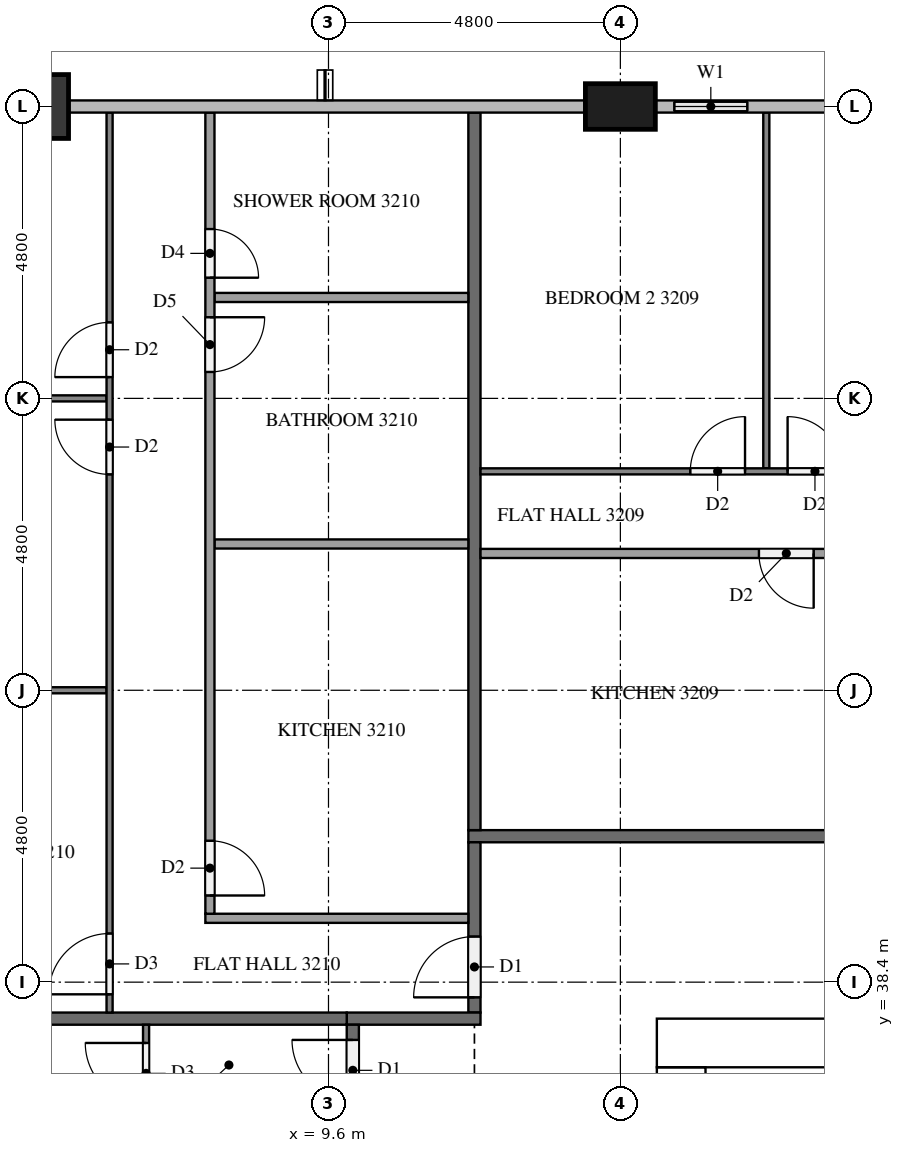
"""IFC4 building model, lengths in metres.
Left out: names, types, materials, properties, quantities, classifications, styles, units other than length and angle.
Written with IfcOpenShell. Run it as: python <this file> out.ifc"""

import sys

from ifc_helpers import new_model, si_unit, direction, frame, frame_2d, origin, origin_2d, place, context, subcontext, project, spatial, rectangle, extrude, element, fill, save


model = new_model("IFC4")
c1 = context("Model", 3, precision=1e-05, world=origin(), true_north=direction((0.0, 1.0)))
c2 = subcontext(c1, "Body", "Model", "MODEL_VIEW")
j1 = project(units=[si_unit("LENGTHUNIT", "METRE"), si_unit("PLANEANGLEUNIT", "RADIAN")], contexts=[c1])
p1 = place(None, origin())
s1 = spatial("IfcSite", under=j1, at=p1, CompositionType="ELEMENT")
p2 = place(p1, origin())
s2 = spatial("IfcBuilding", under=s1, at=p2, CompositionType="ELEMENT")
p3 = place(p2, frame((0.0, 0.0, 126.1)))
s3 = spatial("IfcBuildingStorey", under=s2, at=p3, CompositionType="ELEMENT", Elevation=126.1)
p4 = place(p3, frame((15.0, 37.4, 0.0), z_axis=(0.0, 0.0, 1.0), x_axis=(1.0, 0.0, 0.0)))
e1 = element("IfcWall", 1, at=p4, inside=s3, PredefinedType="SHEAR", context=c2, shape_type="SweptSolid", body=[
    extrude(rectangle(XDim=32.4, YDim=0.8, at=frame_2d((16.2, 0.0))), origin(), (0.0, 0.0, 1.0), 3.2),
])
p5 = place(p4, frame((15.3, 0.0, 0.0)))
e2 = element("IfcOpeningElement", 2, at=p5, cuts=e1, PredefinedType="OPENING", context=c2, shape_type="SweptSolid", body=[
    extrude(rectangle(XDim=1.8, YDim=2.1, at=frame_2d((0.9, 1.05))), frame((0.0, 0.41, 0.0), z_axis=(0.0, -1.0, 0.0), x_axis=(1.0, 0.0, 0.0)), (0.0, 0.0, 1.0), 0.82),
])
p6 = place(p4, frame((1.51, 0.0, 0.0)))
e3 = element("IfcOpeningElement", 3, at=p6, cuts=e1, PredefinedType="OPENING", context=c2, shape_type="SweptSolid", body=[
    extrude(rectangle(XDim=1.0, YDim=2.1, at=frame_2d((0.5, 1.05))), frame((0.0, 0.41, 0.0), z_axis=(0.0, -1.0, 0.0), x_axis=(1.0, 0.0, 0.0)), (0.0, 0.0, 1.0), 0.82),
])
p7 = place(p4, frame((5.11, 0.0, 0.0)))
e4 = element("IfcOpeningElement", 4, at=p7, cuts=e1, PredefinedType="OPENING", context=c2, shape_type="SweptSolid", body=[
    extrude(rectangle(XDim=1.0, YDim=2.1, at=frame_2d((0.5, 1.05))), frame((0.0, 0.41, 0.0), z_axis=(0.0, -1.0, 0.0), x_axis=(1.0, 0.0, 0.0)), (0.0, 0.0, 1.0), 0.82),
])
p8 = place(p3, frame((15.4, 15.8, 0.0), z_axis=(0.0, 0.0, 1.0), x_axis=(0.0, 1.0, 0.0)))
e5 = element("IfcWall", 5, at=p8, inside=s3, PredefinedType="SHEAR", context=c2, shape_type="SweptSolid", body=[
    extrude(rectangle(XDim=21.2, YDim=0.8, at=frame_2d((10.6, 0.0))), origin(), (0.0, 0.0, 1.0), 3.2),
])
p9 = place(p8, frame((4.96, 0.0, 0.0)))
e6 = element("IfcOpeningElement", 6, at=p9, cuts=e5, PredefinedType="OPENING", context=c2, shape_type="SweptSolid", body=[
    extrude(rectangle(XDim=1.2, YDim=2.1, at=frame_2d((0.6, 1.05))), frame((0.0, 0.41, 0.0), z_axis=(0.0, -1.0, 0.0), x_axis=(1.0, 0.0, 0.0)), (0.0, 0.0, 1.0), 0.82),
])
p10 = place(p3, frame((14.4, 52.8, 0.0), z_axis=(0.0, 0.0, 1.0), x_axis=(1.0, 0.0, 0.0)))
e7 = element("IfcColumn", 7, at=p10, inside=s3, PredefinedType="COLUMN", context=c2, shape_type="SweptSolid", body=[
    extrude(rectangle(XDim=1.15, YDim=0.75, at=origin_2d()), origin(), (0.0, 0.0, 1.0), 3.2),
])
p11 = place(p3, frame((4.8, 52.8, 0.0), z_axis=(0.0, 0.0, 1.0), x_axis=(1.0, 0.0, 0.0)))
e8 = element("IfcColumn", 8, at=p11, inside=s3, PredefinedType="COLUMN", context=c2, shape_type="SweptSolid", body=[
    extrude(rectangle(XDim=1.05, YDim=1.05, at=origin_2d()), origin(), (0.0, 0.0, 1.0), 3.2),
])
p12 = place(p3, frame((16.8, 52.8, 0.0), z_axis=(0.0, 0.0, 1.0), x_axis=(-1.0, 0.0, 0.0)))
e9 = element("IfcWall", 9, at=p12, inside=s3, PredefinedType="SOLIDWALL", context=c2, shape_type="SweptSolid", body=[
    extrude(rectangle(XDim=1.825, YDim=0.15, at=frame_2d((0.913, 0.0))), origin(), (0.0, 0.0, 1.0), 3.2),
])
p13 = place(p12, frame((0.312, 0.0, 0.9)))
e10 = element("IfcOpeningElement", 10, at=p13, cuts=e9, PredefinedType="OPENING", context=c2, shape_type="SweptSolid", body=[
    extrude(rectangle(XDim=1.2, YDim=1.4, at=frame_2d((0.6, 0.7))), frame((0.0, 0.085, 0.0), z_axis=(0.0, -1.0, 0.0), x_axis=(1.0, 0.0, 0.0)), (0.0, 0.0, 1.0), 0.17),
])
p14 = place(p3, frame((11.9, 40.8, 0.0), z_axis=(0.0, 0.0, 1.0), x_axis=(1.0, 0.0, 0.0)))
e11 = element("IfcWall", 11, at=p14, inside=s3, PredefinedType="PARTITIONING", context=c2, shape_type="SweptSolid", body=[
    extrude(rectangle(XDim=38.6, YDim=0.2, at=frame_2d((19.3, 0.0))), origin(), (0.0, 0.0, 1.0), 3.2),
])
p15 = place(p14, frame((37.15, 0.0, 0.0)))
e12 = element("IfcOpeningElement", 12, at=p15, cuts=e11, PredefinedType="OPENING", context=c2, shape_type="SweptSolid", body=[
    extrude(rectangle(XDim=1.0, YDim=2.1, at=frame_2d((0.5, 1.05))), frame((0.0, 0.11, 0.0), z_axis=(0.0, -1.0, 0.0), x_axis=(1.0, 0.0, 0.0)), (0.0, 0.0, 1.0), 0.22),
])
p16 = place(p14, frame((27.55, 0.0, 0.0)))
e13 = element("IfcOpeningElement", 13, at=p16, cuts=e11, PredefinedType="OPENING", context=c2, shape_type="SweptSolid", body=[
    extrude(rectangle(XDim=1.0, YDim=2.1, at=frame_2d((0.5, 1.05))), frame((0.0, 0.11, 0.0), z_axis=(0.0, -1.0, 0.0), x_axis=(1.0, 0.0, 0.0)), (0.0, 0.0, 1.0), 0.22),
])
p17 = place(p14, frame((13.15, 0.0, 0.0)))
e14 = element("IfcOpeningElement", 14, at=p17, cuts=e11, PredefinedType="OPENING", context=c2, shape_type="SweptSolid", body=[
    extrude(rectangle(XDim=1.0, YDim=2.1, at=frame_2d((0.5, 1.05))), frame((0.0, 0.11, 0.0), z_axis=(0.0, -1.0, 0.0), x_axis=(1.0, 0.0, 0.0)), (0.0, 0.0, 1.0), 0.22),
])
p18 = place(p3, frame((12.0, 37.9, 0.0), z_axis=(0.0, 0.0, 1.0), x_axis=(0.0, 1.0, 0.0)))
e15 = element("IfcWall", 15, at=p18, inside=s3, PredefinedType="PARTITIONING", context=c2, shape_type="SweptSolid", body=[
    extrude(rectangle(XDim=2.8, YDim=0.2, at=frame_2d((1.4, 0.0))), origin(), (0.0, 0.0, 1.0), 3.2),
])
p19 = place(p18, frame((0.25, 0.0, 0.0)))
e16 = element("IfcOpeningElement", 16, at=p19, cuts=e15, PredefinedType="OPENING", context=c2, shape_type="SweptSolid", body=[
    extrude(rectangle(XDim=1.0, YDim=2.1, at=frame_2d((0.5, 1.05))), frame((0.0, 0.11, 0.0), z_axis=(0.0, -1.0, 0.0), x_axis=(1.0, 0.0, 0.0)), (0.0, 0.0, 1.0), 0.22),
])
p20 = place(p3, frame((12.1, 37.8, 0.0), z_axis=(0.0, 0.0, 1.0), x_axis=(-1.0, 0.0, 0.0)))
e17 = element("IfcWall", 17, at=p20, inside=s3, PredefinedType="PARTITIONING", context=c2, shape_type="SweptSolid", body=[
    extrude(rectangle(XDim=2.2, YDim=0.2, at=frame_2d((1.1, 0.0))), origin(), (0.0, 0.0, 1.0), 3.2),
])
p21 = place(p3, frame((10.0, 15.1, 0.0), z_axis=(0.0, 0.0, 1.0), x_axis=(0.0, 1.0, 0.0)))
e18 = element("IfcWall", 18, at=p21, inside=s3, PredefinedType="PARTITIONING", context=c2, shape_type="SweptSolid", body=[
    extrude(rectangle(XDim=22.6, YDim=0.2, at=frame_2d((11.3, 0.0))), origin(), (0.0, 0.0, 1.0), 3.2),
])
p22 = place(p21, frame((21.35, 0.0, 0.0)))
e19 = element("IfcOpeningElement", 19, at=p22, cuts=e18, PredefinedType="OPENING", context=c2, shape_type="SweptSolid", body=[
    extrude(rectangle(XDim=1.0, YDim=2.1, at=frame_2d((0.5, 1.05))), frame((0.0, 0.11, 0.0), z_axis=(0.0, -1.0, 0.0), x_axis=(1.0, 0.0, 0.0)), (0.0, 0.0, 1.0), 0.22),
])
p23 = place(p21, frame((12.35, 0.0, 0.0)))
e20 = element("IfcOpeningElement", 20, at=p23, cuts=e18, PredefinedType="OPENING", context=c2, shape_type="SweptSolid", body=[
    extrude(rectangle(XDim=1.0, YDim=2.1, at=frame_2d((0.5, 1.05))), frame((0.0, 0.11, 0.0), z_axis=(0.0, -1.0, 0.0), x_axis=(1.0, 0.0, 0.0)), (0.0, 0.0, 1.0), 0.22),
])
p24 = place(p3, frame((12.0, 52.7, 0.0), z_axis=(0.0, 0.0, 1.0), x_axis=(0.0, -1.0, 0.0)))
e21 = element("IfcWall", 21, at=p24, inside=s3, PredefinedType="PARTITIONING", context=c2, shape_type="SweptSolid", body=[
    extrude(rectangle(XDim=11.8, YDim=0.2, at=frame_2d((5.9, 0.0))), origin(), (0.0, 0.0, 1.0), 3.2),
])
p25 = place(p3, frame((0.375, 37.8, 0.0), z_axis=(0.0, 0.0, 1.0), x_axis=(1.0, 0.0, 0.0)))
e22 = element("IfcWall", 22, at=p25, inside=s3, PredefinedType="PARTITIONING", context=c2, shape_type="SweptSolid", body=[
    extrude(rectangle(XDim=9.525, YDim=0.2, at=frame_2d((4.762, 0.0))), origin(), (0.0, 0.0, 1.0), 3.2),
])
p26 = place(p3, frame((16.8, 46.85, 0.0), z_axis=(0.0, 0.0, 1.0), x_axis=(0.0, 1.0, 0.0)))
e23 = element("IfcWall", 23, at=p26, inside=s3, PredefinedType="PARTITIONING", context=c2, shape_type="SweptSolid", body=[
    extrude(rectangle(XDim=5.85, YDim=0.1, at=frame_2d((2.925, 0.0))), origin(), (0.0, 0.0, 1.0), 3.2),
])
p27 = place(p3, frame((12.1, 46.8, 0.0), z_axis=(0.0, 0.0, 1.0), x_axis=(1.0, 0.0, 0.0)))
e24 = element("IfcWall", 24, at=p27, inside=s3, PredefinedType="PARTITIONING", context=c2, shape_type="SweptSolid", body=[
    extrude(rectangle(XDim=14.2, YDim=0.1, at=frame_2d((7.1, 0.0))), origin(), (0.0, 0.0, 1.0), 3.2),
])
p28 = place(p27, frame((12.9, 0.0, 0.0)))
e25 = element("IfcOpeningElement", 25, at=p28, cuts=e24, PredefinedType="OPENING", context=c2, shape_type="SweptSolid", body=[
    extrude(rectangle(XDim=1.0, YDim=2.1, at=frame_2d((0.5, 1.05))), frame((0.0, 0.06, 0.0), z_axis=(0.0, -1.0, 0.0), x_axis=(1.0, 0.0, 0.0)), (0.0, 0.0, 1.0), 0.12),
])
p29 = place(p27, frame((5.05, 0.0, 0.0)))
e26 = element("IfcOpeningElement", 26, at=p29, cuts=e24, PredefinedType="OPENING", context=c2, shape_type="SweptSolid", body=[
    extrude(rectangle(XDim=0.9, YDim=2.1, at=frame_2d((0.45, 1.05))), frame((0.0, 0.06, 0.0), z_axis=(0.0, -1.0, 0.0), x_axis=(1.0, 0.0, 0.0)), (0.0, 0.0, 1.0), 0.12),
])
p30 = place(p27, frame((3.45, 0.0, 0.0)))
e27 = element("IfcOpeningElement", 27, at=p30, cuts=e24, PredefinedType="OPENING", context=c2, shape_type="SweptSolid", body=[
    extrude(rectangle(XDim=0.9, YDim=2.1, at=frame_2d((0.45, 1.05))), frame((0.0, 0.06, 0.0), z_axis=(0.0, -1.0, 0.0), x_axis=(1.0, 0.0, 0.0)), (0.0, 0.0, 1.0), 0.12),
])
p31 = place(p3, frame((24.675, 45.45, 0.0), z_axis=(0.0, 0.0, 1.0), x_axis=(-1.0, 0.0, 0.0)))
e28 = element("IfcWall", 28, at=p31, inside=s3, PredefinedType="PARTITIONING", context=c2, shape_type="SweptSolid", body=[
    extrude(rectangle(XDim=12.575, YDim=0.15, at=frame_2d((6.288, 0.0))), origin(), (0.0, 0.0, 1.0), 3.2),
])
p32 = place(p31, frame((0.3, 0.0, 0.0)))
e29 = element("IfcOpeningElement", 29, at=p32, cuts=e28, PredefinedType="OPENING", context=c2, shape_type="SweptSolid", body=[
    extrude(rectangle(XDim=0.9, YDim=2.1, at=frame_2d((0.45, 1.05))), frame((0.0, 0.085, 0.0), z_axis=(0.0, -1.0, 0.0), x_axis=(1.0, 0.0, 0.0)), (0.0, 0.0, 1.0), 0.17),
])
p33 = place(p31, frame((5.646, 0.0, 0.0)))
e30 = element("IfcOpeningElement", 30, at=p33, cuts=e28, PredefinedType="OPENING", context=c2, shape_type="SweptSolid", body=[
    extrude(rectangle(XDim=0.8, YDim=2.1, at=frame_2d((0.4, 1.05))), frame((0.0, 0.085, 0.0), z_axis=(0.0, -1.0, 0.0), x_axis=(1.0, 0.0, 0.0)), (0.0, 0.0, 1.0), 0.17),
])
p34 = place(p31, frame((7.096, 0.0, 0.0)))
e31 = element("IfcOpeningElement", 31, at=p34, cuts=e28, PredefinedType="OPENING", context=c2, shape_type="SweptSolid", body=[
    extrude(rectangle(XDim=0.9, YDim=2.1, at=frame_2d((0.45, 1.05))), frame((0.0, 0.085, 0.0), z_axis=(0.0, -1.0, 0.0), x_axis=(1.0, 0.0, 0.0)), (0.0, 0.0, 1.0), 0.17),
])
p35 = place(p3, frame((5.95, 43.2, 0.0), z_axis=(0.0, 0.0, 1.0), x_axis=(-1.0, 0.0, 0.0)))
e32 = element("IfcWall", 32, at=p35, inside=s3, PredefinedType="PARTITIONING", context=c2, shape_type="SweptSolid", body=[
    extrude(rectangle(XDim=5.85, YDim=0.1, at=frame_2d((2.925, 0.0))), origin(), (0.0, 0.0, 1.0), 3.2),
])
p36 = place(p3, frame((5.95, 48.0, 0.0), z_axis=(0.0, 0.0, 1.0), x_axis=(-1.0, 0.0, 0.0)))
e33 = element("IfcWall", 33, at=p36, inside=s3, PredefinedType="PARTITIONING", context=c2, shape_type="SweptSolid", body=[
    extrude(rectangle(XDim=5.425, YDim=0.1, at=frame_2d((2.712, 0.0))), origin(), (0.0, 0.0, 1.0), 3.2),
])
p37 = place(p3, frame((6.0, 37.9, 0.0), z_axis=(0.0, 0.0, 1.0), x_axis=(0.0, 1.0, 0.0)))
e34 = element("IfcWall", 34, at=p37, inside=s3, PredefinedType="PARTITIONING", context=c2, shape_type="SweptSolid", body=[
    extrude(rectangle(XDim=14.8, YDim=0.1, at=frame_2d((7.4, 0.0))), origin(), (0.0, 0.0, 1.0), 3.2),
])
p38 = place(p37, frame((0.3, 0.0, 0.0)))
e35 = element("IfcOpeningElement", 35, at=p38, cuts=e34, PredefinedType="OPENING", context=c2, shape_type="SweptSolid", body=[
    extrude(rectangle(XDim=1.0, YDim=2.1, at=frame_2d((0.5, 1.05))), frame((0.0, 0.06, 0.0), z_axis=(0.0, -1.0, 0.0), x_axis=(1.0, 0.0, 0.0)), (0.0, 0.0, 1.0), 0.12),
])
p39 = place(p37, frame((8.85, 0.0, 0.0)))
e36 = element("IfcOpeningElement", 36, at=p39, cuts=e34, PredefinedType="OPENING", context=c2, shape_type="SweptSolid", body=[
    extrude(rectangle(XDim=0.9, YDim=2.1, at=frame_2d((0.45, 1.05))), frame((0.0, 0.06, 0.0), z_axis=(0.0, -1.0, 0.0), x_axis=(1.0, 0.0, 0.0)), (0.0, 0.0, 1.0), 0.12),
])
p40 = place(p37, frame((10.45, 0.0, 0.0)))
e37 = element("IfcOpeningElement", 37, at=p40, cuts=e34, PredefinedType="OPENING", context=c2, shape_type="SweptSolid", body=[
    extrude(rectangle(XDim=0.9, YDim=2.1, at=frame_2d((0.45, 1.05))), frame((0.0, 0.06, 0.0), z_axis=(0.0, -1.0, 0.0), x_axis=(1.0, 0.0, 0.0)), (0.0, 0.0, 1.0), 0.12),
])
for number, where, z_axis, x_axis in (
    (38, (11.9, 45.606, 0.0), (0.0, 0.0, 1.0), (-1.0, 0.0, 0.0)),
    (39, (11.9, 49.66, 0.0), (0.0, 0.0, 1.0), (-1.0, 0.0, 0.0)),
):
    element("IfcWall", number, at=place(p3, frame(where, z_axis=z_axis, x_axis=x_axis)), inside=s3, PredefinedType="PARTITIONING", context=c2, shape_type="SweptSolid", body=[
        extrude(rectangle(XDim=4.175, YDim=0.15, at=frame_2d((2.087, 0.0))), origin(), (0.0, 0.0, 1.0), 3.2),
    ])
p41 = place(p3, frame((11.9, 39.45, 0.0), z_axis=(0.0, 0.0, 1.0), x_axis=(-1.0, 0.0, 0.0)))
e40 = element("IfcWall", 40, at=p41, inside=s3, PredefinedType="PARTITIONING", context=c2, shape_type="SweptSolid", body=[
    extrude(rectangle(XDim=4.325, YDim=0.15, at=frame_2d((2.163, 0.0))), origin(), (0.0, 0.0, 1.0), 3.2),
])
p42 = place(p3, frame((7.65, 52.7, 0.0), z_axis=(0.0, 0.0, 1.0), x_axis=(0.0, -1.0, 0.0)))
e41 = element("IfcWall", 41, at=p42, inside=s3, PredefinedType="PARTITIONING", context=c2, shape_type="SweptSolid", body=[
    extrude(rectangle(XDim=13.175, YDim=0.15, at=frame_2d((6.587, 0.0))), origin(), (0.0, 0.0, 1.0), 3.2),
])
p43 = place(p42, frame((11.975, 0.0, 0.0)))
e42 = element("IfcOpeningElement", 42, at=p43, cuts=e41, PredefinedType="OPENING", context=c2, shape_type="SweptSolid", body=[
    extrude(rectangle(XDim=0.9, YDim=2.1, at=frame_2d((0.45, 1.05))), frame((0.0, 0.085, 0.0), z_axis=(0.0, -1.0, 0.0), x_axis=(1.0, 0.0, 0.0)), (0.0, 0.0, 1.0), 0.17),
])
p44 = place(p42, frame((3.365, 0.0, 0.0)))
e43 = element("IfcOpeningElement", 43, at=p44, cuts=e41, PredefinedType="OPENING", context=c2, shape_type="SweptSolid", body=[
    extrude(rectangle(XDim=0.9, YDim=2.1, at=frame_2d((0.45, 1.05))), frame((0.0, 0.085, 0.0), z_axis=(0.0, -1.0, 0.0), x_axis=(1.0, 0.0, 0.0)), (0.0, 0.0, 1.0), 0.17),
])
p45 = place(p42, frame((1.915, 0.0, 0.0)))
e44 = element("IfcOpeningElement", 44, at=p45, cuts=e41, PredefinedType="OPENING", context=c2, shape_type="SweptSolid", body=[
    extrude(rectangle(XDim=0.8, YDim=2.1, at=frame_2d((0.4, 1.05))), frame((0.0, 0.085, 0.0), z_axis=(0.0, -1.0, 0.0), x_axis=(1.0, 0.0, 0.0)), (0.0, 0.0, 1.0), 0.17),
])
p46 = place(p3, frame((6.6, 28.9, 0.0), z_axis=(0.0, 0.0, 1.0), x_axis=(0.0, 1.0, 0.0)))
e45 = element("IfcWall", 45, at=p46, inside=s3, PredefinedType="PARTITIONING", context=c2, shape_type="SweptSolid", body=[
    extrude(rectangle(XDim=8.8, YDim=0.1, at=frame_2d((4.4, 0.0))), origin(), (0.0, 0.0, 1.0), 3.2),
])
p47 = place(p46, frame((7.5, 0.0, 0.0)))
e46 = element("IfcOpeningElement", 46, at=p47, cuts=e45, PredefinedType="OPENING", context=c2, shape_type="SweptSolid", body=[
    extrude(rectangle(XDim=1.0, YDim=2.1, at=frame_2d((0.5, 1.05))), frame((0.0, 0.06, 0.0), z_axis=(0.0, -1.0, 0.0), x_axis=(1.0, 0.0, 0.0)), (0.0, 0.0, 1.0), 0.12),
])
p48 = place(p46, frame((0.3, 0.0, 0.0)))
e47 = element("IfcOpeningElement", 47, at=p48, cuts=e45, PredefinedType="OPENING", context=c2, shape_type="SweptSolid", body=[
    extrude(rectangle(XDim=0.9, YDim=2.1, at=frame_2d((0.45, 1.05))), frame((0.0, 0.06, 0.0), z_axis=(0.0, -1.0, 0.0), x_axis=(1.0, 0.0, 0.0)), (0.0, 0.0, 1.0), 0.12),
])
p49 = place(p13, origin())
e48 = element("IfcWindow", 48, at=p49, inside=s3, PartitioningType="SINGLE_PANEL", PredefinedType="WINDOW", context=c2, shape_type="SweptSolid", body=[
    extrude(rectangle(XDim=1.2, YDim=1.4, at=frame_2d((0.6, 0.7))), frame((0.0, 0.03, 0.0), z_axis=(0.0, -1.0, 0.0), x_axis=(1.0, 0.0, 0.0)), (0.0, 0.0, 1.0), 0.06),
])
fill(e10, e48)
p50 = place(p6, origin())
e49 = element("IfcDoor", 49, at=p50, inside=s3, OperationType="SINGLE_SWING_LEFT", PredefinedType="DOOR", context=c2, shape_type="SweptSolid", body=[
    extrude(rectangle(XDim=1.0, YDim=2.1, at=frame_2d((0.5, 1.05))), frame((0.0, 0.025, 0.0), z_axis=(0.0, -1.0, 0.0), x_axis=(1.0, 0.0, 0.0)), (0.0, 0.0, 1.0), 0.05),
])
fill(e3, e49)
p51 = place(p19, origin())
e50 = element("IfcDoor", 50, at=p51, inside=s3, OperationType="SINGLE_SWING_LEFT", PredefinedType="DOOR", context=c2, shape_type="SweptSolid", body=[
    extrude(rectangle(XDim=1.0, YDim=2.1, at=frame_2d((0.5, 1.05))), frame((0.0, 0.025, 0.0), z_axis=(0.0, -1.0, 0.0), x_axis=(1.0, 0.0, 0.0)), (0.0, 0.0, 1.0), 0.05),
])
fill(e16, e50)
p52 = place(p22, origin())
e51 = element("IfcDoor", 51, at=p52, inside=s3, OperationType="SINGLE_SWING_RIGHT", PredefinedType="DOOR", context=c2, shape_type="SweptSolid", body=[
    extrude(rectangle(XDim=1.0, YDim=2.1, at=frame_2d((0.5, 1.05))), frame((0.0, 0.025, 0.0), z_axis=(0.0, -1.0, 0.0), x_axis=(1.0, 0.0, 0.0)), (0.0, 0.0, 1.0), 0.05),
])
fill(e19, e51)
p53 = place(p29, origin())
e52 = element("IfcDoor", 52, at=p53, inside=s3, OperationType="SINGLE_SWING_LEFT", PredefinedType="DOOR", context=c2, shape_type="SweptSolid", body=[
    extrude(rectangle(XDim=0.9, YDim=2.1, at=frame_2d((0.45, 1.05))), frame((0.0, 0.025, 0.0), z_axis=(0.0, -1.0, 0.0), x_axis=(1.0, 0.0, 0.0)), (0.0, 0.0, 1.0), 0.05),
])
fill(e26, e52)
p54 = place(p30, origin())
e53 = element("IfcDoor", 53, at=p54, inside=s3, OperationType="SINGLE_SWING_RIGHT", PredefinedType="DOOR", context=c2, shape_type="SweptSolid", body=[
    extrude(rectangle(XDim=0.9, YDim=2.1, at=frame_2d((0.45, 1.05))), frame((0.0, 0.025, 0.0), z_axis=(0.0, -1.0, 0.0), x_axis=(1.0, 0.0, 0.0)), (0.0, 0.0, 1.0), 0.05),
])
fill(e27, e53)
p55 = place(p34, origin())
e54 = element("IfcDoor", 54, at=p55, inside=s3, OperationType="SINGLE_SWING_LEFT", PredefinedType="DOOR", context=c2, shape_type="SweptSolid", body=[
    extrude(rectangle(XDim=0.9, YDim=2.1, at=frame_2d((0.45, 1.05))), frame((0.0, 0.025, 0.0), z_axis=(0.0, -1.0, 0.0), x_axis=(1.0, 0.0, 0.0)), (0.0, 0.0, 1.0), 0.05),
])
fill(e31, e54)
p56 = place(p38, origin())
e55 = element("IfcDoor", 55, at=p56, inside=s3, OperationType="SINGLE_SWING_LEFT", PredefinedType="DOOR", context=c2, shape_type="SweptSolid", body=[
    extrude(rectangle(XDim=1.0, YDim=2.1, at=frame_2d((0.5, 1.05))), frame((0.0, 0.025, 0.0), z_axis=(0.0, -1.0, 0.0), x_axis=(1.0, 0.0, 0.0)), (0.0, 0.0, 1.0), 0.05),
])
fill(e35, e55)
p57 = place(p39, origin())
e56 = element("IfcDoor", 56, at=p57, inside=s3, OperationType="SINGLE_SWING_RIGHT", PredefinedType="DOOR", context=c2, shape_type="SweptSolid", body=[
    extrude(rectangle(XDim=0.9, YDim=2.1, at=frame_2d((0.45, 1.05))), frame((0.0, 0.025, 0.0), z_axis=(0.0, -1.0, 0.0), x_axis=(1.0, 0.0, 0.0)), (0.0, 0.0, 1.0), 0.05),
])
fill(e36, e56)
p58 = place(p40, origin())
e57 = element("IfcDoor", 57, at=p58, inside=s3, OperationType="SINGLE_SWING_LEFT", PredefinedType="DOOR", context=c2, shape_type="SweptSolid", body=[
    extrude(rectangle(XDim=0.9, YDim=2.1, at=frame_2d((0.45, 1.05))), frame((0.0, 0.025, 0.0), z_axis=(0.0, -1.0, 0.0), x_axis=(1.0, 0.0, 0.0)), (0.0, 0.0, 1.0), 0.05),
])
fill(e37, e57)
p59 = place(p43, origin())
e58 = element("IfcDoor", 58, at=p59, inside=s3, OperationType="SINGLE_SWING_RIGHT", PredefinedType="DOOR", context=c2, shape_type="SweptSolid", body=[
    extrude(rectangle(XDim=0.9, YDim=2.1, at=frame_2d((0.45, 1.05))), frame((0.0, 0.025, 0.0), z_axis=(0.0, -1.0, 0.0), x_axis=(1.0, 0.0, 0.0)), (0.0, 0.0, 1.0), 0.05),
])
fill(e42, e58)
p60 = place(p44, origin())
e59 = element("IfcDoor", 59, at=p60, inside=s3, OperationType="SINGLE_SWING_LEFT", PredefinedType="DOOR", context=c2, shape_type="SweptSolid", body=[
    extrude(rectangle(XDim=0.9, YDim=2.1, at=frame_2d((0.45, 1.05))), frame((0.0, 0.025, 0.0), z_axis=(0.0, -1.0, 0.0), x_axis=(1.0, 0.0, 0.0)), (0.0, 0.0, 1.0), 0.05),
])
fill(e43, e59)
p61 = place(p45, origin())
e60 = element("IfcDoor", 60, at=p61, inside=s3, OperationType="SINGLE_SWING_RIGHT", PredefinedType="DOOR", context=c2, shape_type="SweptSolid", body=[
    extrude(rectangle(XDim=0.8, YDim=2.1, at=frame_2d((0.4, 1.05))), frame((0.0, 0.025, 0.0), z_axis=(0.0, -1.0, 0.0), x_axis=(1.0, 0.0, 0.0)), (0.0, 0.0, 1.0), 0.05),
])
fill(e44, e60)
p62 = place(p47, origin())
e61 = element("IfcDoor", 61, at=p62, inside=s3, OperationType="SINGLE_SWING_RIGHT", PredefinedType="DOOR", context=c2, shape_type="SweptSolid", body=[
    extrude(rectangle(XDim=1.0, YDim=2.1, at=frame_2d((0.5, 1.05))), frame((0.0, 0.025, 0.0), z_axis=(0.0, -1.0, 0.0), x_axis=(1.0, 0.0, 0.0)), (0.0, 0.0, 1.0), 0.05),
])
fill(e46, e61)
save(model, sys.argv[1])
